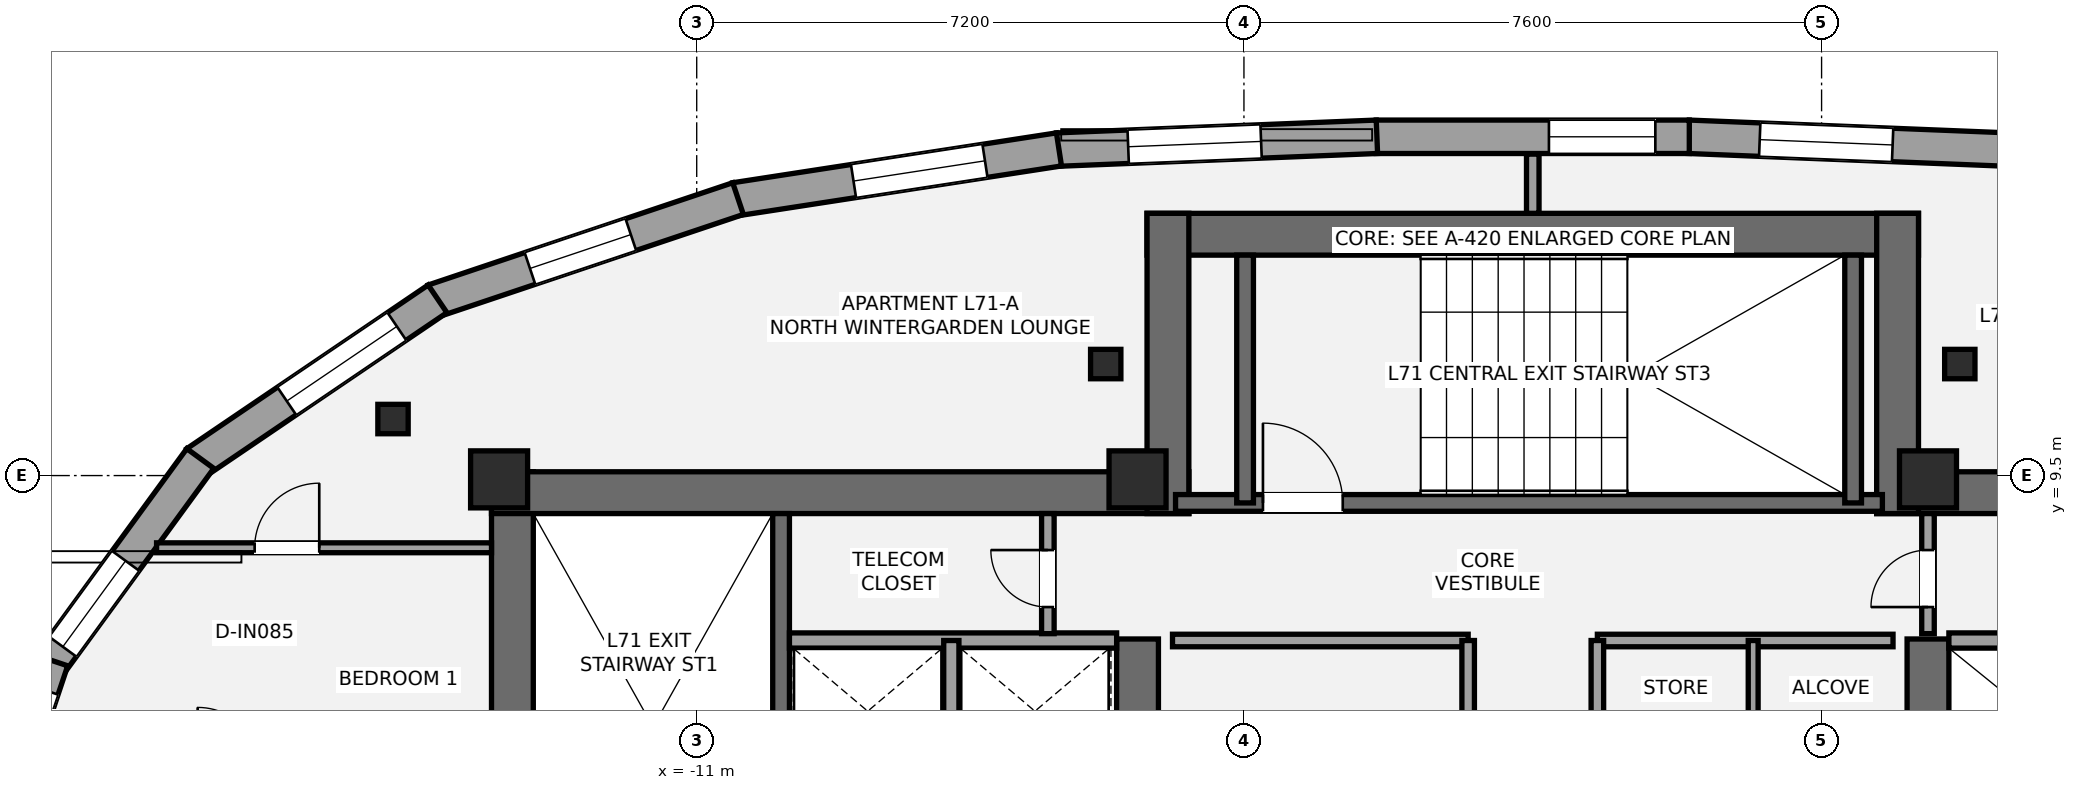
"""IFC4 building model, lengths in metres.
Left out: names, types, materials, properties, quantities, classifications, styles, units other than length and angle.
Written with IfcOpenShell. Run it as: python <this file> out.ifc"""

import sys

from ifc_helpers import new_model, si_unit, direction, frame, frame_2d, origin, origin_2d, place, context, subcontext, project, spatial, rectangle, i_section, extrude, element, fill, save


model = new_model("IFC4")
c1 = context("Model", 3, precision=1e-05, world=origin(), true_north=direction((0.0, 1.0)))
c2 = subcontext(c1, "Body", "Model", "MODEL_VIEW")
j1 = project(units=[si_unit("LENGTHUNIT", "METRE"), si_unit("PLANEANGLEUNIT", "RADIAN")], contexts=[c1])
p1 = place(None, origin())
s1 = spatial("IfcSite", under=j1, at=p1, CompositionType="ELEMENT")
p2 = place(p1, origin())
s2 = spatial("IfcBuilding", under=s1, at=p2, CompositionType="ELEMENT")
p3 = place(p2, frame((0.0, 0.0, 250.95)))
s3 = spatial("IfcBuildingStorey", under=s2, at=p3, CompositionType="ELEMENT", Elevation=250.95)
p4 = place(p3, frame((-13.425, 1.3, 0.0), z_axis=(0.0, 0.0, 1.0), x_axis=(0.0, 1.0, 0.0)))
e1 = element("IfcWall", 1, at=p4, inside=s3, PredefinedType="SHEAR", context=c2, shape_type="SweptSolid", body=[
    extrude(rectangle(XDim=8.25, YDim=0.55, at=frame_2d((4.125, 0.0))), origin(), (0.0, 0.0, 1.0), 3.15),
])
p5 = place(p3, frame((-13.7, 9.275, 0.0), z_axis=(0.0, 0.0, 1.0), x_axis=(1.0, 0.0, 0.0)))
e2 = element("IfcWall", 2, at=p5, inside=s3, PredefinedType="SHEAR", context=c2, shape_type="SweptSolid", body=[
    extrude(rectangle(XDim=9.175, YDim=0.55, at=frame_2d((4.587, 0.0))), origin(), (0.0, 0.0, 1.0), 3.15),
])
p6 = place(p3, frame((-5.2, 5.35, 0.0), z_axis=(0.0, 0.0, 1.0), x_axis=(0.0, 1.0, 0.0)))
e3 = element("IfcWall", 3, at=p6, inside=s3, PredefinedType="SHEAR", context=c2, shape_type="SweptSolid", body=[
    extrude(rectangle(XDim=2.0, YDim=0.55, at=frame_2d((1.0, 0.0))), origin(), (0.0, 0.0, 1.0), 3.15),
])
p7 = place(p3, frame((-9.89, 1.85, 0.0), z_axis=(0.0, 0.0, 1.0), x_axis=(0.0, 1.0, 0.0)))
e4 = element("IfcWall", 4, at=p7, inside=s3, PredefinedType="SHEAR", context=c2, shape_type="SweptSolid", body=[
    extrude(rectangle(XDim=7.15, YDim=0.22, at=frame_2d((3.575, 0.0))), origin(), (0.0, 0.0, 1.0), 3.15),
])
p8 = place(p3, frame((4.525, 9.275, 0.0), z_axis=(0.0, 0.0, 1.0), x_axis=(1.0, 0.0, 0.0)))
e5 = element("IfcWall", 5, at=p8, inside=s3, PredefinedType="SHEAR", context=c2, shape_type="SweptSolid", body=[
    extrude(rectangle(XDim=9.175, YDim=0.55, at=frame_2d((4.587, 0.0))), origin(), (0.0, 0.0, 1.0), 3.15),
])
p9 = place(p3, frame((5.2, 5.35, 0.0), z_axis=(0.0, 0.0, 1.0), x_axis=(0.0, 1.0, 0.0)))
e6 = element("IfcWall", 6, at=p9, inside=s3, PredefinedType="SHEAR", context=c2, shape_type="SweptSolid", body=[
    extrude(rectangle(XDim=2.0, YDim=0.55, at=frame_2d((1.0, 0.0))), origin(), (0.0, 0.0, 1.0), 3.15),
])
p10 = place(p3, frame((-5.075, 12.675, 0.0), z_axis=(0.0, 0.0, 1.0), x_axis=(1.0, 0.0, 0.0)))
e7 = element("IfcWall", 7, at=p10, inside=s3, PredefinedType="SHEAR", context=c2, shape_type="SweptSolid", body=[
    extrude(rectangle(XDim=10.15, YDim=0.55, at=frame_2d((5.075, 0.0))), origin(), (0.0, 0.0, 1.0), 3.15),
])
for number, where, z_axis, x_axis in (
    (8, (-4.8, 9.0, 0.0), (0.0, 0.0, 1.0), (0.0, 1.0, 0.0)),
    (9, (4.8, 9.0, 0.0), (0.0, 0.0, 1.0), (0.0, 1.0, 0.0)),
):
    element("IfcWall", number, at=place(p3, frame(where, z_axis=z_axis, x_axis=x_axis)), inside=s3, PredefinedType="SHEAR", context=c2, shape_type="SweptSolid", body=[
        extrude(rectangle(XDim=3.95, YDim=0.55, at=frame_2d((1.975, 0.0))), origin(), (0.0, 0.0, 1.0), 3.15),
    ])
p11 = place(p3, frame((-4.7, 9.14, 0.0), z_axis=(0.0, 0.0, 1.0), x_axis=(1.0, 0.0, 0.0)))
e10 = element("IfcWall", 10, at=p11, inside=s3, PredefinedType="SHEAR", context=c2, shape_type="SweptSolid", body=[
    extrude(rectangle(XDim=9.3, YDim=0.22, at=frame_2d((4.65, 0.0))), origin(), (0.0, 0.0, 1.0), 3.15),
])
p12 = place(p11, frame((1.15, 0.0, 0.0)))
e11 = element("IfcOpeningElement", 11, at=p12, cuts=e10, PredefinedType="OPENING", context=c2, shape_type="SweptSolid", body=[
    extrude(rectangle(XDim=1.05, YDim=2.15, at=frame_2d((0.525, 1.075))), frame((0.0, 0.12, 0.0), z_axis=(0.0, -1.0, 0.0), x_axis=(1.0, 0.0, 0.0)), (0.0, 0.0, 1.0), 0.24),
])
for number, where, z_axis, x_axis in (
    (12, (-3.785, 9.14, 0.0), (0.0, 0.0, 1.0), (0.0, 1.0, 0.0)),
    (13, (4.215, 9.14, 0.0), (0.0, 0.0, 1.0), (0.0, 1.0, 0.0)),
):
    element("IfcWall", number, at=place(p3, frame(where, z_axis=z_axis, x_axis=x_axis)), inside=s3, PredefinedType="SHEAR", context=c2, shape_type="SweptSolid", body=[
        extrude(rectangle(XDim=3.26, YDim=0.22, at=frame_2d((1.63, 0.0))), origin(), (0.0, 0.0, 1.0), 3.15),
    ])
for number, where, z_axis, x_axis in (
    (14, (-13.6, 9.45, 0.0), (0.0, 0.0, 1.0), (1.0, 0.0, 0.0)),
    (15, (-5.2, 9.45, 0.0), (0.0, 0.0, 1.0), (1.0, 0.0, 0.0)),
    (16, (5.2, 9.45, 0.0), (0.0, 0.0, 1.0), (1.0, 0.0, 0.0)),
):
    element("IfcColumn", number, at=place(p3, frame(where, z_axis=z_axis, x_axis=x_axis)), inside=s3, PredefinedType="PILASTER", context=c2, shape_type="SweptSolid", body=[
        extrude(rectangle(XDim=0.75, YDim=0.75, at=origin_2d()), origin(), (0.0, 0.0, 1.0), 3.15),
    ])
for number, where, z_axis, x_axis in (
    (17, (5.619, 10.967, 0.0), (0.0, 0.0, 1.0), (1.0, 0.0, 0.0)),
    (18, (-5.619, 10.967, 0.0), (0.0, 0.0, 1.0), (1.0, 0.0, 0.0)),
    (19, (-14.996, 10.244, 0.0), (0.0, 0.0, 1.0), (1.0, 0.0, 0.0)),
):
    element("IfcColumn", number, at=place(p3, frame(where, z_axis=z_axis, x_axis=x_axis)), inside=s3, PredefinedType="COLUMN", context=c2, shape_type="SweptSolid", body=[
        extrude(i_section(OverallWidth=0.399, OverallDepth=0.387, WebThickness=0.021, FlangeThickness=0.033, at=origin_2d()), origin(), (0.0, 0.0, 1.0), 3.15),
    ])
p13 = place(p3, frame((2.051, 13.957, 0.0), z_axis=(0.0, 0.0, 1.0), x_axis=(0.999195020948, -0.040116207618, 0.0)))
e20 = element("IfcWall", 20, at=p13, inside=s3, PredefinedType="STANDARD", context=c2, shape_type="SweptSolid", body=[
    extrude(rectangle(XDim=4.211, YDim=0.44, at=frame_2d((2.106, 0.0))), origin(), (0.0, 0.0, 1.0), 2.336),
])
p14 = place(p13, frame((0.936, 0.0, 0.55)))
e21 = element("IfcOpeningElement", 21, at=p14, cuts=e20, PredefinedType="OPENING", context=c2, shape_type="SweptSolid", body=[
    extrude(rectangle(XDim=1.75, YDim=1.55, at=frame_2d((0.875, 0.775))), frame((0.0, 0.23, 0.0), z_axis=(0.0, -1.0, 0.0), x_axis=(1.0, 0.0, 0.0)), (0.0, 0.0, 1.0), 0.46),
])
p15 = place(p3, frame((-2.059, 13.957, 0.0), z_axis=(0.0, 0.0, 1.0), x_axis=(1.0, 0.0, 0.0)))
e22 = element("IfcWall", 22, at=p15, inside=s3, PredefinedType="STANDARD", context=c2, shape_type="SweptSolid", body=[
    extrude(rectangle(XDim=4.119, YDim=0.44, at=frame_2d((2.059, 0.0))), origin(), (0.0, 0.0, 1.0), 2.336),
])
p16 = place(p15, frame((2.272, 0.0, 0.58)))
e23 = element("IfcOpeningElement", 23, at=p16, cuts=e22, PredefinedType="OPENING", context=c2, shape_type="SweptSolid", body=[
    extrude(rectangle(XDim=1.4, YDim=1.55, at=frame_2d((0.7, 0.775))), frame((0.0, 0.23, 0.0), z_axis=(0.0, -1.0, 0.0), x_axis=(1.0, 0.0, 0.0)), (0.0, 0.0, 1.0), 0.46),
])
p17 = place(p3, frame((-6.259, 13.788, 0.0), z_axis=(0.0, 0.0, 1.0), x_axis=(0.999195020948, 0.040116207618, 0.0)))
e24 = element("IfcWall", 24, at=p17, inside=s3, PredefinedType="STANDARD", context=c2, shape_type="SweptSolid", body=[
    extrude(rectangle(XDim=4.211, YDim=0.44, at=frame_2d((2.106, 0.0))), origin(), (0.0, 0.0, 1.0), 2.336),
])
p18 = place(p17, frame((0.936, 0.0, 0.55)))
e25 = element("IfcOpeningElement", 25, at=p18, cuts=e24, PredefinedType="OPENING", context=c2, shape_type="SweptSolid", body=[
    extrude(rectangle(XDim=1.75, YDim=1.55, at=frame_2d((0.875, 0.775))), frame((0.0, 0.23, 0.0), z_axis=(0.0, -1.0, 0.0), x_axis=(1.0, 0.0, 0.0)), (0.0, 0.0, 1.0), 0.46),
])
p19 = place(p3, frame((-10.493, 13.135, 0.0), z_axis=(0.0, 0.0, 1.0), x_axis=(0.988352039028, 0.152184910389, 0.0)))
e26 = element("IfcWall", 26, at=p19, inside=s3, PredefinedType="STANDARD", context=c2, shape_type="SweptSolid", body=[
    extrude(rectangle(XDim=4.309, YDim=0.44, at=frame_2d((2.155, 0.0))), origin(), (0.0, 0.0, 1.0), 2.336),
])
p20 = place(p19, frame((1.574, 0.0, 0.55)))
e27 = element("IfcOpeningElement", 27, at=p20, cuts=e26, PredefinedType="OPENING", context=c2, shape_type="SweptSolid", body=[
    extrude(rectangle(XDim=1.75, YDim=1.55, at=frame_2d((0.875, 0.775))), frame((0.0, 0.23, 0.0), z_axis=(0.0, -1.0, 0.0), x_axis=(1.0, 0.0, 0.0)), (0.0, 0.0, 1.0), 0.46),
])
p21 = place(p3, frame((-14.463, 11.799, 0.0), z_axis=(0.0, 0.0, 1.0), x_axis=(0.948005346594, 0.318254399545, 0.0)))
e28 = element("IfcWall", 28, at=p21, inside=s3, PredefinedType="STANDARD", context=c2, shape_type="SweptSolid", body=[
    extrude(rectangle(XDim=4.227, YDim=0.44, at=frame_2d((2.113, 0.0))), origin(), (0.0, 0.0, 1.0), 2.336),
])
p22 = place(p21, frame((1.339, 0.0, 0.55)))
e29 = element("IfcOpeningElement", 29, at=p22, cuts=e28, PredefinedType="OPENING", context=c2, shape_type="SweptSolid", body=[
    extrude(rectangle(XDim=1.4, YDim=1.55, at=frame_2d((0.7, 0.775))), frame((0.0, 0.23, 0.0), z_axis=(0.0, -1.0, 0.0), x_axis=(1.0, 0.0, 0.0)), (0.0, 0.0, 1.0), 0.46),
])
p23 = place(p3, frame((-17.586, 9.672, 0.0), z_axis=(0.0, 0.0, 1.0), x_axis=(0.827707997274, 0.56115904274, 0.0)))
e30 = element("IfcWall", 30, at=p23, inside=s3, PredefinedType="STANDARD", context=c2, shape_type="SweptSolid", body=[
    extrude(rectangle(XDim=3.837, YDim=0.44, at=frame_2d((1.918, 0.0))), origin(), (0.0, 0.0, 1.0), 2.336),
])
p24 = place(p23, frame((1.44, 0.0, 0.55)))
e31 = element("IfcOpeningElement", 31, at=p24, cuts=e30, PredefinedType="OPENING", context=c2, shape_type="SweptSolid", body=[
    extrude(rectangle(XDim=1.75, YDim=1.55, at=frame_2d((0.875, 0.775))), frame((0.0, 0.23, 0.0), z_axis=(0.0, -1.0, 0.0), x_axis=(1.0, 0.0, 0.0)), (0.0, 0.0, 1.0), 0.46),
])
p25 = place(p3, frame((-19.515, 7.007, 0.0), z_axis=(0.0, 0.0, 1.0), x_axis=(0.589698134284, 0.807623743102, 0.0)))
e32 = element("IfcWall", 32, at=p25, inside=s3, PredefinedType="STANDARD", context=c2, shape_type="SweptSolid", body=[
    extrude(rectangle(XDim=3.364, YDim=0.44, at=frame_2d((1.682, 0.0))), origin(), (0.0, 0.0, 1.0), 2.336),
])
p26 = place(p25, frame((0.298, 0.0, 0.58)))
e33 = element("IfcOpeningElement", 33, at=p26, cuts=e32, PredefinedType="OPENING", context=c2, shape_type="SweptSolid", body=[
    extrude(rectangle(XDim=1.4, YDim=1.55, at=frame_2d((0.7, 0.775))), frame((0.0, 0.23, 0.0), z_axis=(0.0, -1.0, 0.0), x_axis=(1.0, 0.0, 0.0)), (0.0, 0.0, 1.0), 0.46),
])
p27 = place(p3, frame((-20.452, 4.179, 0.0), z_axis=(0.0, 0.0, 1.0), x_axis=(0.317622332961, 0.948217302945, 0.0)))
e34 = element("IfcWall", 34, at=p27, inside=s3, PredefinedType="STANDARD", context=c2, shape_type="SweptSolid", body=[
    extrude(rectangle(XDim=3.045, YDim=0.44, at=frame_2d((1.523, 0.0))), origin(), (0.0, 0.0, 1.0), 2.336),
])
p28 = place(p27, frame((1.746, 0.0, 0.58)))
e35 = element("IfcOpeningElement", 35, at=p28, cuts=e34, PredefinedType="OPENING", context=c2, shape_type="SweptSolid", body=[
    extrude(rectangle(XDim=0.9, YDim=1.35, at=frame_2d((0.45, 0.675))), frame((0.0, 0.23, 0.0), z_axis=(0.0, -1.0, 0.0), x_axis=(1.0, 0.0, 0.0)), (0.0, 0.0, 1.0), 0.46),
])
p29 = place(p3, frame((-9.78, 7.33, 0.0), z_axis=(0.0, 0.0, 1.0), x_axis=(1.0, 0.0, 0.0)))
e36 = element("IfcWall", 36, at=p29, inside=s3, PredefinedType="SOLIDWALL", context=c2, shape_type="SweptSolid", body=[
    extrude(rectangle(XDim=4.305, YDim=0.2, at=frame_2d((2.152, 0.0))), origin(), (0.0, 0.0, 1.0), 2.97),
])
p30 = place(p3, frame((-7.65, 5.47, 0.0), z_axis=(0.0, 0.0, 1.0), x_axis=(0.0, 1.0, 0.0)))
e37 = element("IfcWall", 37, at=p30, inside=s3, PredefinedType="SOLIDWALL", context=c2, shape_type="SweptSolid", body=[
    extrude(rectangle(XDim=1.86, YDim=0.2, at=frame_2d((0.93, 0.0))), origin(), (0.0, 0.0, 1.0), 2.97),
])
p31 = place(p3, frame((5.475, 7.33, 0.0), z_axis=(0.0, 0.0, 1.0), x_axis=(1.0, 0.0, 0.0)))
e38 = element("IfcWall", 38, at=p31, inside=s3, PredefinedType="SOLIDWALL", context=c2, shape_type="SweptSolid", body=[
    extrude(rectangle(XDim=4.305, YDim=0.2, at=frame_2d((2.152, 0.0))), origin(), (0.0, 0.0, 1.0), 2.97),
])
p32 = place(p3, frame((-4.74, 7.33, 0.0), z_axis=(0.0, 0.0, 1.0), x_axis=(1.0, 0.0, 0.0)))
e39 = element("IfcWall", 39, at=p32, inside=s3, PredefinedType="PARTITIONING", context=c2, shape_type="SweptSolid", body=[
    extrude(rectangle(XDim=3.89, YDim=0.165, at=frame_2d((1.945, 0.0))), origin(), (0.0, 0.0, 1.0), 2.97),
])
p33 = place(p3, frame((-0.85, 5.52, 0.0), z_axis=(0.0, 0.0, 1.0), x_axis=(0.0, 1.0, 0.0)))
e40 = element("IfcWall", 40, at=p33, inside=s3, PredefinedType="PARTITIONING", context=c2, shape_type="SweptSolid", body=[
    extrude(rectangle(XDim=1.81, YDim=0.165, at=frame_2d((0.905, 0.0))), origin(), (0.0, 0.0, 1.0), 2.97),
])
p34 = place(p3, frame((0.85, 7.33, 0.0), z_axis=(0.0, 0.0, 1.0), x_axis=(1.0, 0.0, 0.0)))
e41 = element("IfcWall", 41, at=p34, inside=s3, PredefinedType="PARTITIONING", context=c2, shape_type="SweptSolid", body=[
    extrude(rectangle(XDim=3.89, YDim=0.165, at=frame_2d((1.945, 0.0))), origin(), (0.0, 0.0, 1.0), 2.97),
])
p35 = place(p3, frame((0.85, 5.52, 0.0), z_axis=(0.0, 0.0, 1.0), x_axis=(0.0, 1.0, 0.0)))
e42 = element("IfcWall", 42, at=p35, inside=s3, PredefinedType="PARTITIONING", context=c2, shape_type="SweptSolid", body=[
    extrude(rectangle(XDim=1.81, YDim=0.165, at=frame_2d((0.905, 0.0))), origin(), (0.0, 0.0, 1.0), 2.97),
])
p36 = place(p3, frame((2.9, 5.52, 0.0), z_axis=(0.0, 0.0, 1.0), x_axis=(0.0, 1.0, 0.0)))
e43 = element("IfcWall", 43, at=p36, inside=s3, PredefinedType="PARTITIONING", context=c2, shape_type="SweptSolid", body=[
    extrude(rectangle(XDim=1.81, YDim=0.13, at=frame_2d((0.905, 0.0))), origin(), (0.0, 0.0, 1.0), 2.97),
])
p37 = place(p3, frame((-6.38, 7.42, 0.0), z_axis=(0.0, 0.0, 1.0), x_axis=(0.0, 1.0, 0.0)))
e44 = element("IfcWall", 44, at=p37, inside=s3, PredefinedType="PARTITIONING", context=c2, shape_type="SweptSolid", body=[
    extrude(rectangle(XDim=1.58, YDim=0.165, at=frame_2d((0.79, 0.0))), origin(), (0.0, 0.0, 1.0), 2.97),
])
p38 = place(p37, frame((0.35, 0.0, 0.0)))
e45 = element("IfcOpeningElement", 45, at=p38, cuts=e44, PredefinedType="OPENING", context=c2, shape_type="SweptSolid", body=[
    extrude(rectangle(XDim=0.75, YDim=2.1, at=frame_2d((0.375, 1.05))), frame((0.0, 0.093, 0.0), z_axis=(0.0, -1.0, 0.0), x_axis=(1.0, 0.0, 0.0)), (0.0, 0.0, 1.0), 0.185),
])
p39 = place(p3, frame((5.2, 7.42, 0.0), z_axis=(0.0, 0.0, 1.0), x_axis=(0.0, 1.0, 0.0)))
e46 = element("IfcWall", 46, at=p39, inside=s3, PredefinedType="PARTITIONING", context=c2, shape_type="SweptSolid", body=[
    extrude(rectangle(XDim=1.58, YDim=0.165, at=frame_2d((0.79, 0.0))), origin(), (0.0, 0.0, 1.0), 2.97),
])
p40 = place(p39, frame((0.35, 0.0, 0.0)))
e47 = element("IfcOpeningElement", 47, at=p40, cuts=e46, PredefinedType="OPENING", context=c2, shape_type="SweptSolid", body=[
    extrude(rectangle(XDim=0.75, YDim=2.1, at=frame_2d((0.375, 1.05))), frame((0.0, 0.093, 0.0), z_axis=(0.0, -1.0, 0.0), x_axis=(1.0, 0.0, 0.0)), (0.0, 0.0, 1.0), 0.185),
])
p41 = place(p3, frame((0.0, 12.95, 0.0), z_axis=(0.0, 0.0, 1.0), x_axis=(0.0, 1.0, 0.0)))
e48 = element("IfcWall", 48, at=p41, inside=s3, PredefinedType="PARTITIONING", context=c2, shape_type="SweptSolid", body=[
    extrude(rectangle(XDim=0.779, YDim=0.165, at=frame_2d((0.39, 0.0))), origin(), (0.0, 0.0, 1.0), 2.97),
])
p42 = place(p3, frame((-18.107, 8.55, 0.0), z_axis=(0.0, 0.0, 1.0), x_axis=(1.0, 0.0, 0.0)))
e49 = element("IfcWall", 49, at=p42, inside=s3, PredefinedType="PARTITIONING", context=c2, shape_type="SweptSolid", body=[
    extrude(rectangle(XDim=4.407, YDim=0.13, at=frame_2d((2.203, 0.0))), origin(), (0.0, 0.0, 1.0), 2.423),
])
p43 = place(p42, frame((1.29, 0.0, 0.0)))
e50 = element("IfcOpeningElement", 50, at=p43, cuts=e49, PredefinedType="OPENING", context=c2, shape_type="SweptSolid", body=[
    extrude(rectangle(XDim=0.85, YDim=2.1, at=frame_2d((0.425, 1.05))), frame((0.0, 0.075, 0.0), z_axis=(0.0, -1.0, 0.0), x_axis=(1.0, 0.0, 0.0)), (0.0, 0.0, 1.0), 0.15),
])
p44 = place(p14, origin())
e51 = element("IfcWindow", 51, at=p44, inside=s3, PartitioningType="SINGLE_PANEL", PredefinedType="WINDOW", context=c2, shape_type="SweptSolid", body=[
    extrude(rectangle(XDim=1.75, YDim=1.55, at=frame_2d((0.875, 0.775))), frame((0.0, -0.01, 0.0), z_axis=(0.0, -1.0, 0.0), x_axis=(1.0, 0.0, 0.0)), (0.0, 0.0, 1.0), 0.06),
])
fill(e21, e51)
p45 = place(p16, origin())
e52 = element("IfcWindow", 52, at=p45, inside=s3, PartitioningType="SINGLE_PANEL", PredefinedType="WINDOW", context=c2, shape_type="SweptSolid", body=[
    extrude(rectangle(XDim=1.4, YDim=1.55, at=frame_2d((0.7, 0.775))), frame((0.0, -0.01, 0.0), z_axis=(0.0, -1.0, 0.0), x_axis=(1.0, 0.0, 0.0)), (0.0, 0.0, 1.0), 0.06),
])
fill(e23, e52)
p46 = place(p18, origin())
e53 = element("IfcWindow", 53, at=p46, inside=s3, PartitioningType="SINGLE_PANEL", PredefinedType="WINDOW", context=c2, shape_type="SweptSolid", body=[
    extrude(rectangle(XDim=1.75, YDim=1.55, at=frame_2d((0.875, 0.775))), frame((0.0, -0.01, 0.0), z_axis=(0.0, -1.0, 0.0), x_axis=(1.0, 0.0, 0.0)), (0.0, 0.0, 1.0), 0.06),
])
fill(e25, e53)
p47 = place(p20, origin())
e54 = element("IfcWindow", 54, at=p47, inside=s3, PartitioningType="SINGLE_PANEL", PredefinedType="WINDOW", context=c2, shape_type="SweptSolid", body=[
    extrude(rectangle(XDim=1.75, YDim=1.55, at=frame_2d((0.875, 0.775))), frame((0.0, -0.01, 0.0), z_axis=(0.0, -1.0, 0.0), x_axis=(1.0, 0.0, 0.0)), (0.0, 0.0, 1.0), 0.06),
])
fill(e27, e54)
p48 = place(p22, origin())
e55 = element("IfcWindow", 55, at=p48, inside=s3, PartitioningType="SINGLE_PANEL", PredefinedType="WINDOW", context=c2, shape_type="SweptSolid", body=[
    extrude(rectangle(XDim=1.4, YDim=1.55, at=frame_2d((0.7, 0.775))), frame((0.0, -0.01, 0.0), z_axis=(0.0, -1.0, 0.0), x_axis=(1.0, 0.0, 0.0)), (0.0, 0.0, 1.0), 0.06),
])
fill(e29, e55)
p49 = place(p24, origin())
e56 = element("IfcWindow", 56, at=p49, inside=s3, PartitioningType="SINGLE_PANEL", PredefinedType="WINDOW", context=c2, shape_type="SweptSolid", body=[
    extrude(rectangle(XDim=1.75, YDim=1.55, at=frame_2d((0.875, 0.775))), frame((0.0, -0.01, 0.0), z_axis=(0.0, -1.0, 0.0), x_axis=(1.0, 0.0, 0.0)), (0.0, 0.0, 1.0), 0.06),
])
fill(e31, e56)
p50 = place(p26, origin())
e57 = element("IfcWindow", 57, at=p50, inside=s3, PartitioningType="SINGLE_PANEL", PredefinedType="WINDOW", context=c2, shape_type="SweptSolid", body=[
    extrude(rectangle(XDim=1.4, YDim=1.55, at=frame_2d((0.7, 0.775))), frame((0.0, -0.01, 0.0), z_axis=(0.0, -1.0, 0.0), x_axis=(1.0, 0.0, 0.0)), (0.0, 0.0, 1.0), 0.06),
])
fill(e33, e57)
p51 = place(p12, origin())
e58 = element("IfcDoor", 58, at=p51, inside=s3, OperationType="SINGLE_SWING_LEFT", PredefinedType="DOOR", context=c2, shape_type="SweptSolid", body=[
    extrude(rectangle(XDim=1.05, YDim=2.15, at=frame_2d((0.525, 1.075))), frame((0.0, 0.025, 0.0), z_axis=(0.0, -1.0, 0.0), x_axis=(1.0, 0.0, 0.0)), (0.0, 0.0, 1.0), 0.05),
])
fill(e11, e58)
p52 = place(p38, origin())
e59 = element("IfcDoor", 59, at=p52, inside=s3, OperationType="SINGLE_SWING_RIGHT", PredefinedType="DOOR", context=c2, shape_type="SweptSolid", body=[
    extrude(rectangle(XDim=0.75, YDim=2.1, at=frame_2d((0.375, 1.05))), frame((0.0, 0.025, 0.0), z_axis=(0.0, -1.0, 0.0), x_axis=(1.0, 0.0, 0.0)), (0.0, 0.0, 1.0), 0.05),
])
fill(e45, e59)
p53 = place(p40, origin())
e60 = element("IfcDoor", 60, at=p53, inside=s3, OperationType="SINGLE_SWING_LEFT", PredefinedType="DOOR", context=c2, shape_type="SweptSolid", body=[
    extrude(rectangle(XDim=0.75, YDim=2.1, at=frame_2d((0.375, 1.05))), frame((0.0, 0.025, 0.0), z_axis=(0.0, -1.0, 0.0), x_axis=(1.0, 0.0, 0.0)), (0.0, 0.0, 1.0), 0.05),
])
fill(e47, e60)
p54 = place(p43, origin())
e61 = element("IfcDoor", 61, at=p54, inside=s3, OperationType="SINGLE_SWING_RIGHT", PredefinedType="DOOR", context=c2, shape_type="SweptSolid", body=[
    extrude(rectangle(XDim=0.85, YDim=2.1, at=frame_2d((0.425, 1.05))), frame((0.0, 0.025, 0.0), z_axis=(0.0, -1.0, 0.0), x_axis=(1.0, 0.0, 0.0)), (0.0, 0.0, 1.0), 0.05),
])
fill(e50, e61)
save(model, sys.argv[1])
